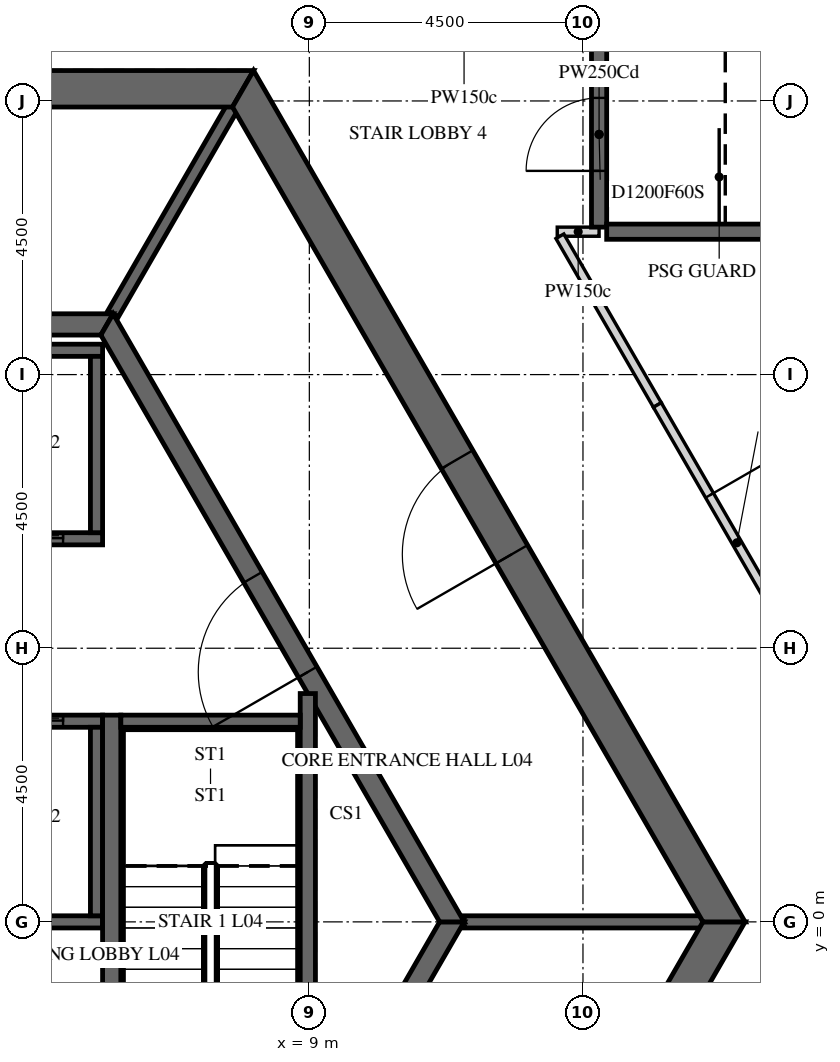
"""IFC4 building model, lengths in metres.
Left out: names, types, materials, properties, quantities, classifications, styles, units other than length and angle.
Written with IfcOpenShell. Run it as: python <this file> out.ifc"""

import sys

from ifc_helpers import new_model, si_unit, direction, frame, frame_2d, origin, place, context, subcontext, project, spatial, polyline, rectangle, outline, extrude, element, fill, save


model = new_model("IFC4")
c1 = context("Model", 3, precision=1e-05, world=origin(), true_north=direction((0.0, 1.0)))
c2 = subcontext(c1, "Body", "Model", "MODEL_VIEW")
j1 = project(units=[si_unit("LENGTHUNIT", "METRE"), si_unit("PLANEANGLEUNIT", "RADIAN")], contexts=[c1])
p1 = place(None, origin())
s1 = spatial("IfcSite", under=j1, at=p1, CompositionType="ELEMENT")
p2 = place(p1, origin())
s2 = spatial("IfcBuilding", under=s1, at=p2, CompositionType="ELEMENT")
p3 = place(p2, frame((0.0, 0.0, 26.0)))
s3 = spatial("IfcBuildingStorey", under=s2, at=p3, CompositionType="ELEMENT", Elevation=26.0)
p4 = place(p3, frame((7.91, -13.7, -0.25), z_axis=(0.0, 0.0, 1.0), x_axis=(0.499999880136, 0.866025472988, 0.0)))
e1 = element("IfcWall", 1, at=p4, inside=s3, PredefinedType="SHEAR", context=c2, shape_type="SweptSolid", body=[
    extrude(outline(polyline([(-0.173, -0.3), (15.993, -0.3), (15.646, 0.3), (0.173, 0.3), (-0.173, -0.3)])), origin(), (0.0, 0.0, 1.0), 5.45),
])
p5 = place(p4, frame((7.039, 0.0, 0.25)))
e2 = element("IfcOpeningElement", 2, at=p5, cuts=e1, PredefinedType="OPENING", context=c2, shape_type="SweptSolid", body=[
    extrude(rectangle(XDim=1.8, YDim=2.4, at=frame_2d((0.9, 1.2))), frame((0.0, 0.31, 0.0), z_axis=(0.0, -1.0, 0.0), x_axis=(1.0, 0.0, 0.0)), (0.0, 0.0, 1.0), 0.62),
])
p6 = place(p3, frame((15.819, 0.0, -0.25), z_axis=(0.0, 0.0, 1.0), x_axis=(-0.499999880136, 0.866025472988, 0.0)))
e3 = element("IfcWall", 3, at=p6, inside=s3, PredefinedType="SHEAR", context=c2, shape_type="SweptSolid", body=[
    extrude(outline(polyline([(-0.173, -0.3), (15.993, -0.3), (15.646, 0.3), (0.173, 0.3), (-0.173, -0.3)])), origin(), (0.0, 0.0, 1.0), 5.45),
])
p7 = place(p6, frame((6.981, 0.0, 0.25)))
e4 = element("IfcOpeningElement", 4, at=p7, cuts=e3, PredefinedType="OPENING", context=c2, shape_type="SweptSolid", body=[
    extrude(rectangle(XDim=1.8, YDim=2.4, at=frame_2d((0.9, 1.2))), frame((0.0, 0.31, 0.0), z_axis=(0.0, -1.0, 0.0), x_axis=(1.0, 0.0, 0.0)), (0.0, 0.0, 1.0), 0.62),
])
p8 = place(p3, frame((7.91, 13.7, -0.25), z_axis=(0.0, 0.0, 1.0), x_axis=(-1.0, 0.0, 0.0)))
e5 = element("IfcWall", 5, at=p8, inside=s3, PredefinedType="SHEAR", context=c2, shape_type="SweptSolid", body=[
    extrude(outline(polyline([(-0.173, -0.3), (15.993, -0.3), (15.646, 0.3), (0.173, 0.3), (-0.173, -0.3)])), origin(), (0.0, 0.0, 1.0), 5.45),
])
p9 = place(p8, frame((7.31, 0.0, 0.25)))
e6 = element("IfcOpeningElement", 6, at=p9, cuts=e5, PredefinedType="OPENING", context=c2, shape_type="SweptSolid", body=[
    extrude(rectangle(XDim=1.2, YDim=2.4, at=frame_2d((0.6, 1.2))), frame((0.0, 0.31, 0.0), z_axis=(0.0, -1.0, 0.0), x_axis=(1.0, 0.0, 0.0)), (0.0, 0.0, 1.0), 0.62),
])
p10 = place(p3, frame((5.673, -9.825, -0.25), z_axis=(0.0, 0.0, 1.0), x_axis=(0.499995046907, 0.866028263435, 0.0)))
e7 = element("IfcWall", 7, at=p10, inside=s3, PredefinedType="SHEAR", context=c2, shape_type="SweptSolid", body=[
    extrude(outline(polyline([(-0.101, -0.175), (11.446, -0.175), (11.244, 0.175), (0.101, 0.175), (-0.101, -0.175)])), origin(), (0.0, 0.0, 1.0), 5.45),
])
p11 = place(p10, frame((4.801, 0.0, 0.25)))
e8 = element("IfcOpeningElement", 8, at=p11, cuts=e7, PredefinedType="OPENING", context=c2, shape_type="SweptSolid", body=[
    extrude(rectangle(XDim=1.8, YDim=2.4, at=frame_2d((0.9, 1.2))), frame((0.0, 0.185, 0.0), z_axis=(0.0, -1.0, 0.0), x_axis=(1.0, 0.0, 0.0)), (0.0, 0.0, 1.0), 0.37),
])
p12 = place(p3, frame((11.345, 0.0, -0.25), z_axis=(0.0, 0.0, 1.0), x_axis=(-0.499995046907, 0.866028263435, 0.0)))
e9 = element("IfcWall", 9, at=p12, inside=s3, PredefinedType="SHEAR", context=c2, shape_type="SweptSolid", body=[
    extrude(outline(polyline([(-0.101, -0.175), (11.446, -0.175), (11.244, 0.175), (0.101, 0.175), (-0.101, -0.175)])), origin(), (0.0, 0.0, 1.0), 5.45),
])
p13 = place(p12, frame((4.744, 0.0, 0.25)))
e10 = element("IfcOpeningElement", 10, at=p13, cuts=e9, PredefinedType="OPENING", context=c2, shape_type="SweptSolid", body=[
    extrude(rectangle(XDim=1.8, YDim=2.4, at=frame_2d((0.9, 1.2))), frame((0.0, 0.185, 0.0), z_axis=(0.0, -1.0, 0.0), x_axis=(1.0, 0.0, 0.0)), (0.0, 0.0, 1.0), 0.37),
])
p14 = place(p3, frame((5.673, 9.825, -0.25), z_axis=(0.0, 0.0, 1.0), x_axis=(-1.0, 0.0, 0.0)))
e11 = element("IfcWall", 11, at=p14, inside=s3, PredefinedType="SHEAR", context=c2, shape_type="SweptSolid", body=[
    extrude(outline(polyline([(-0.101, -0.175), (11.446, -0.175), (11.244, 0.175), (0.101, 0.175), (-0.101, -0.175)])), origin(), (0.0, 0.0, 1.0), 5.45),
])
p15 = place(p3, frame((-5.6, 6.3, -0.25), z_axis=(0.0, 0.0, 1.0), x_axis=(1.0, 0.0, 0.0)))
e12 = element("IfcWall", 12, at=p15, inside=s3, PredefinedType="SHEAR", context=c2, shape_type="SweptSolid", body=[
    extrude(rectangle(XDim=11.2, YDim=0.2, at=frame_2d((5.6, 0.0))), origin(), (0.0, 0.0, 1.0), 5.5),
])
p16 = place(p15, frame((0.65, 0.0, 0.25)))
e13 = element("IfcOpeningElement", 13, at=p16, cuts=e12, PredefinedType="OPENING", context=c2, shape_type="SweptSolid", body=[
    extrude(rectangle(XDim=1.1, YDim=2.1, at=frame_2d((0.55, 1.05))), frame((0.0, 0.11, 0.0), z_axis=(0.0, -1.0, 0.0), x_axis=(1.0, 0.0, 0.0)), (0.0, 0.0, 1.0), 0.22),
])
p17 = place(p15, frame((2.85, 0.0, 0.25)))
e14 = element("IfcOpeningElement", 14, at=p17, cuts=e12, PredefinedType="OPENING", context=c2, shape_type="SweptSolid", body=[
    extrude(rectangle(XDim=1.1, YDim=2.1, at=frame_2d((0.55, 1.05))), frame((0.0, 0.11, 0.0), z_axis=(0.0, -1.0, 0.0), x_axis=(1.0, 0.0, 0.0)), (0.0, 0.0, 1.0), 0.22),
])
p18 = place(p15, frame((5.05, 0.0, 0.25)))
e15 = element("IfcOpeningElement", 15, at=p18, cuts=e12, PredefinedType="OPENING", context=c2, shape_type="SweptSolid", body=[
    extrude(rectangle(XDim=1.1, YDim=2.1, at=frame_2d((0.55, 1.05))), frame((0.0, 0.11, 0.0), z_axis=(0.0, -1.0, 0.0), x_axis=(1.0, 0.0, 0.0)), (0.0, 0.0, 1.0), 0.22),
])
p19 = place(p15, frame((7.25, 0.0, 0.25)))
e16 = element("IfcOpeningElement", 16, at=p19, cuts=e12, PredefinedType="OPENING", context=c2, shape_type="SweptSolid", body=[
    extrude(rectangle(XDim=1.1, YDim=2.1, at=frame_2d((0.55, 1.05))), frame((0.0, 0.11, 0.0), z_axis=(0.0, -1.0, 0.0), x_axis=(1.0, 0.0, 0.0)), (0.0, 0.0, 1.0), 0.22),
])
p20 = place(p15, frame((9.45, 0.0, 0.25)))
e17 = element("IfcOpeningElement", 17, at=p20, cuts=e12, PredefinedType="OPENING", context=c2, shape_type="SweptSolid", body=[
    extrude(rectangle(XDim=1.1, YDim=2.1, at=frame_2d((0.55, 1.05))), frame((0.0, 0.11, 0.0), z_axis=(0.0, -1.0, 0.0), x_axis=(1.0, 0.0, 0.0)), (0.0, 0.0, 1.0), 0.22),
])
p21 = place(p3, frame((-5.6, 9.4, -0.25), z_axis=(0.0, 0.0, 1.0), x_axis=(1.0, 0.0, 0.0)))
e18 = element("IfcWall", 18, at=p21, inside=s3, PredefinedType="SHEAR", context=c2, shape_type="SweptSolid", body=[
    extrude(rectangle(XDim=11.2, YDim=0.2, at=frame_2d((5.6, 0.0))), origin(), (0.0, 0.0, 1.0), 5.5),
])
p22 = place(p3, frame((5.5, 6.4, -0.25), z_axis=(0.0, 0.0, 1.0), x_axis=(0.0, 1.0, 0.0)))
e19 = element("IfcWall", 19, at=p22, inside=s3, PredefinedType="SHEAR", context=c2, shape_type="SweptSolid", body=[
    extrude(rectangle(XDim=2.9, YDim=0.2, at=frame_2d((1.45, 0.0))), origin(), (0.0, 0.0, 1.0), 5.5),
])
p23 = place(p3, frame((-5.6, 3.3, -0.25), z_axis=(0.0, 0.0, 1.0), x_axis=(1.0, 0.0, 0.0)))
e20 = element("IfcWall", 20, at=p23, inside=s3, PredefinedType="SHEAR", context=c2, shape_type="SweptSolid", body=[
    extrude(rectangle(XDim=11.2, YDim=0.2, at=frame_2d((5.6, 0.0))), origin(), (0.0, 0.0, 1.0), 5.5),
])
p24 = place(p23, frame((0.65, 0.0, 0.25)))
e21 = element("IfcOpeningElement", 21, at=p24, cuts=e20, PredefinedType="OPENING", context=c2, shape_type="SweptSolid", body=[
    extrude(rectangle(XDim=1.1, YDim=2.1, at=frame_2d((0.55, 1.05))), frame((0.0, 0.11, 0.0), z_axis=(0.0, -1.0, 0.0), x_axis=(1.0, 0.0, 0.0)), (0.0, 0.0, 1.0), 0.22),
])
p25 = place(p23, frame((2.85, 0.0, 0.25)))
e22 = element("IfcOpeningElement", 22, at=p25, cuts=e20, PredefinedType="OPENING", context=c2, shape_type="SweptSolid", body=[
    extrude(rectangle(XDim=1.1, YDim=2.1, at=frame_2d((0.55, 1.05))), frame((0.0, 0.11, 0.0), z_axis=(0.0, -1.0, 0.0), x_axis=(1.0, 0.0, 0.0)), (0.0, 0.0, 1.0), 0.22),
])
p26 = place(p23, frame((5.05, 0.0, 0.25)))
e23 = element("IfcOpeningElement", 23, at=p26, cuts=e20, PredefinedType="OPENING", context=c2, shape_type="SweptSolid", body=[
    extrude(rectangle(XDim=1.1, YDim=2.1, at=frame_2d((0.55, 1.05))), frame((0.0, 0.11, 0.0), z_axis=(0.0, -1.0, 0.0), x_axis=(1.0, 0.0, 0.0)), (0.0, 0.0, 1.0), 0.22),
])
p27 = place(p23, frame((7.25, 0.0, 0.25)))
e24 = element("IfcOpeningElement", 24, at=p27, cuts=e20, PredefinedType="OPENING", context=c2, shape_type="SweptSolid", body=[
    extrude(rectangle(XDim=1.1, YDim=2.1, at=frame_2d((0.55, 1.05))), frame((0.0, 0.11, 0.0), z_axis=(0.0, -1.0, 0.0), x_axis=(1.0, 0.0, 0.0)), (0.0, 0.0, 1.0), 0.22),
])
p28 = place(p23, frame((9.45, 0.0, 0.25)))
e25 = element("IfcOpeningElement", 25, at=p28, cuts=e20, PredefinedType="OPENING", context=c2, shape_type="SweptSolid", body=[
    extrude(rectangle(XDim=1.1, YDim=2.1, at=frame_2d((0.55, 1.05))), frame((0.0, 0.11, 0.0), z_axis=(0.0, -1.0, 0.0), x_axis=(1.0, 0.0, 0.0)), (0.0, 0.0, 1.0), 0.22),
])
p29 = place(p3, frame((-5.6, 0.0, -0.25), z_axis=(0.0, 0.0, 1.0), x_axis=(1.0, 0.0, 0.0)))
e26 = element("IfcWall", 26, at=p29, inside=s3, PredefinedType="SHEAR", context=c2, shape_type="SweptSolid", body=[
    extrude(rectangle(XDim=11.2, YDim=0.2, at=frame_2d((5.6, 0.0))), origin(), (0.0, 0.0, 1.0), 5.5),
])
p30 = place(p3, frame((5.5, 0.1, -0.25), z_axis=(0.0, 0.0, 1.0), x_axis=(0.0, 1.0, 0.0)))
e27 = element("IfcWall", 27, at=p30, inside=s3, PredefinedType="SHEAR", context=c2, shape_type="SweptSolid", body=[
    extrude(rectangle(XDim=3.1, YDim=0.2, at=frame_2d((1.55, 0.0))), origin(), (0.0, 0.0, 1.0), 5.5),
])
p31 = place(p3, frame((11.547, 0.0, -0.25), z_axis=(0.0, 0.0, 1.0), x_axis=(1.0, 0.0, 0.0)))
e28 = element("IfcWall", 28, at=p31, inside=s3, PredefinedType="SHEAR", context=c2, shape_type="SweptSolid", body=[
    extrude(rectangle(XDim=3.926, YDim=0.2, at=frame_2d((1.963, 0.0))), origin(), (0.0, 0.0, 1.0), 5.45),
])
p32 = place(p3, frame((5.773, 10.0, -0.25), z_axis=(0.0, 0.0, 1.0), x_axis=(0.500038251005, 0.86600331843, 0.0)))
e29 = element("IfcWall", 29, at=p32, inside=s3, PredefinedType="SHEAR", context=c2, shape_type="SweptSolid", body=[
    extrude(rectangle(XDim=3.926, YDim=0.2, at=frame_2d((1.963, 0.0))), origin(), (0.0, 0.0, 1.0), 5.45),
])
p33 = place(p3, frame((5.75, -3.4, -0.25), z_axis=(0.0, 0.0, 1.0), x_axis=(0.0, 1.0, 0.0)))
e30 = element("IfcWall", 30, at=p33, inside=s3, PredefinedType="SHEAR", context=c2, shape_type="SweptSolid", body=[
    extrude(rectangle(XDim=6.8, YDim=0.3, at=frame_2d((3.4, 0.0))), origin(), (0.0, 0.0, 1.0), 5.5),
])
p34 = place(p3, frame((8.975, -3.755, -0.25), z_axis=(0.0, 0.0, 1.0), x_axis=(0.0, 1.0, 0.0)))
e31 = element("IfcWall", 31, at=p34, inside=s3, PredefinedType="SHEAR", context=c2, shape_type="SweptSolid", body=[
    extrude(rectangle(XDim=7.51, YDim=0.25, at=frame_2d((3.755, 0.0))), origin(), (0.0, 0.0, 1.0), 5.5),
])
p35 = place(p3, frame((5.9, 3.3, -0.25), z_axis=(0.0, 0.0, 1.0), x_axis=(1.0, 0.0, 0.0)))
e32 = element("IfcWall", 32, at=p35, inside=s3, PredefinedType="SHEAR", context=c2, shape_type="SweptSolid", body=[
    extrude(rectangle(XDim=2.95, YDim=0.2, at=frame_2d((1.475, 0.0))), origin(), (0.0, 0.0, 1.0), 5.5),
])
p36 = place(p3, frame((13.765, 11.35, 0.0), z_axis=(0.0, 0.0, 1.0), x_axis=(-1.0, 0.0, 0.0)))
e33 = element("IfcWall", 33, at=p36, inside=s3, PredefinedType="PARTITIONING", context=c2, shape_type="SweptSolid", body=[
    extrude(rectangle(XDim=0.688, YDim=0.15, at=frame_2d((0.344, 0.0))), origin(), (0.0, 0.0, 1.0), 5.2),
])
p37 = place(p3, frame((13.765, 11.425, 0.0), z_axis=(0.0, 0.0, 1.0), x_axis=(0.0, 1.0, 0.0)))
e34 = element("IfcWall", 34, at=p37, inside=s3, PredefinedType="PARTITIONING", context=c2, shape_type="SweptSolid", body=[
    extrude(rectangle(XDim=3.05, YDim=0.25, at=frame_2d((1.525, 0.0))), origin(), (0.0, 0.0, 1.0), 4.273),
])
p38 = place(p37, frame((0.925, 0.0, 0.0)))
e35 = element("IfcOpeningElement", 35, at=p38, cuts=e34, PredefinedType="OPENING", context=c2, shape_type="SweptSolid", body=[
    extrude(rectangle(XDim=1.2, YDim=2.1, at=frame_2d((0.6, 1.05))), frame((0.0, 0.135, 0.0), z_axis=(0.0, -1.0, 0.0), x_axis=(1.0, 0.0, 0.0)), (0.0, 0.0, 1.0), 0.27),
])
p39 = place(p3, frame((14.723, 8.5, 0.0), z_axis=(0.0, 0.0, 1.0), x_axis=(-0.500104956678, 0.865964798538, 0.0)))
e36 = element("IfcWall", 36, at=p39, inside=s3, PredefinedType="PARTITIONING", context=c2, shape_type="SweptSolid", body=[
    extrude(rectangle(XDim=3.204, YDim=0.15, at=frame_2d((1.602, 0.0))), origin(), (0.0, 0.0, 1.0), 5.2),
])
p40 = place(p3, frame((14.723, 8.5, 0.0), z_axis=(0.0, 0.0, 1.0), x_axis=(0.499952654668, -0.866052736899, 0.0)))
e37 = element("IfcWall", 37, at=p40, inside=s3, PredefinedType="PARTITIONING", context=c2, shape_type="SweptSolid", body=[
    extrude(rectangle(XDim=5.233, YDim=0.15, at=frame_2d((2.616, 0.0))), origin(), (0.0, 0.0, 1.0), 5.2),
])
p41 = place(p40, frame((1.716, 0.0, 0.0)))
e38 = element("IfcOpeningElement", 38, at=p41, cuts=e37, PredefinedType="OPENING", context=c2, shape_type="SweptSolid", body=[
    extrude(rectangle(XDim=1.8, YDim=2.1, at=frame_2d((0.9, 1.05))), frame((0.0, 0.085, 0.0), z_axis=(0.0, -1.0, 0.0), x_axis=(1.0, 0.0, 0.0)), (0.0, 0.0, 1.0), 0.17),
])
p42 = place(p3, frame((24.035, 11.35, 0.0), z_axis=(0.0, 0.0, 1.0), x_axis=(-1.0, 0.0, 0.0)))
e39 = element("IfcWall", 39, at=p42, inside=s3, PredefinedType="PARTITIONING", context=c2, shape_type="SweptSolid", body=[
    extrude(rectangle(XDim=10.145, YDim=0.25, at=frame_2d((5.073, 0.0))), origin(), (0.0, 0.0, 1.0), 4.273),
])
p43 = place(p7, origin())
e40 = element("IfcDoor", 40, at=p43, inside=s3, OperationType="DOUBLE_DOOR_SINGLE_SWING", PredefinedType="DOOR", context=c2, shape_type="SweptSolid", body=[
    extrude(rectangle(XDim=1.8, YDim=2.4, at=frame_2d((0.9, 1.2))), frame((0.0, 0.025, 0.0), z_axis=(0.0, -1.0, 0.0), x_axis=(1.0, 0.0, 0.0)), (0.0, 0.0, 1.0), 0.05),
])
fill(e4, e40)
p44 = place(p13, origin())
e41 = element("IfcDoor", 41, at=p44, inside=s3, OperationType="DOUBLE_DOOR_SINGLE_SWING", PredefinedType="DOOR", context=c2, shape_type="SweptSolid", body=[
    extrude(rectangle(XDim=1.8, YDim=2.4, at=frame_2d((0.9, 1.2))), frame((0.0, 0.025, 0.0), z_axis=(0.0, -1.0, 0.0), x_axis=(1.0, 0.0, 0.0)), (0.0, 0.0, 1.0), 0.05),
])
fill(e10, e41)
p45 = place(p20, origin())
e42 = element("IfcDoor", 42, at=p45, inside=s3, OperationType="SLIDING_TO_LEFT", PredefinedType="DOOR", context=c2, shape_type="SweptSolid", body=[
    extrude(rectangle(XDim=1.1, YDim=2.1, at=frame_2d((0.55, 1.05))), frame((0.0, 0.025, 0.0), z_axis=(0.0, -1.0, 0.0), x_axis=(1.0, 0.0, 0.0)), (0.0, 0.0, 1.0), 0.05),
])
fill(e17, e42)
p46 = place(p28, origin())
e43 = element("IfcDoor", 43, at=p46, inside=s3, OperationType="SLIDING_TO_LEFT", PredefinedType="DOOR", context=c2, shape_type="SweptSolid", body=[
    extrude(rectangle(XDim=1.1, YDim=2.1, at=frame_2d((0.55, 1.05))), frame((0.0, 0.025, 0.0), z_axis=(0.0, -1.0, 0.0), x_axis=(1.0, 0.0, 0.0)), (0.0, 0.0, 1.0), 0.05),
])
fill(e25, e43)
p47 = place(p38, origin())
e44 = element("IfcDoor", 44, at=p47, inside=s3, OperationType="SINGLE_SWING_RIGHT", PredefinedType="DOOR", context=c2, shape_type="SweptSolid", body=[
    extrude(rectangle(XDim=1.2, YDim=2.1, at=frame_2d((0.6, 1.05))), frame((0.0, 0.025, 0.0), z_axis=(0.0, -1.0, 0.0), x_axis=(1.0, 0.0, 0.0)), (0.0, 0.0, 1.0), 0.05),
])
fill(e35, e44)
p48 = place(p41, origin())
e45 = element("IfcDoor", 45, at=p48, inside=s3, OperationType="DOUBLE_DOOR_SINGLE_SWING", PredefinedType="DOOR", context=c2, shape_type="SweptSolid", body=[
    extrude(rectangle(XDim=1.8, YDim=2.1, at=frame_2d((0.9, 1.05))), frame((0.0, 0.025, 0.0), z_axis=(0.0, -1.0, 0.0), x_axis=(1.0, 0.0, 0.0)), (0.0, 0.0, 1.0), 0.05),
])
fill(e38, e45)
save(model, sys.argv[1])
